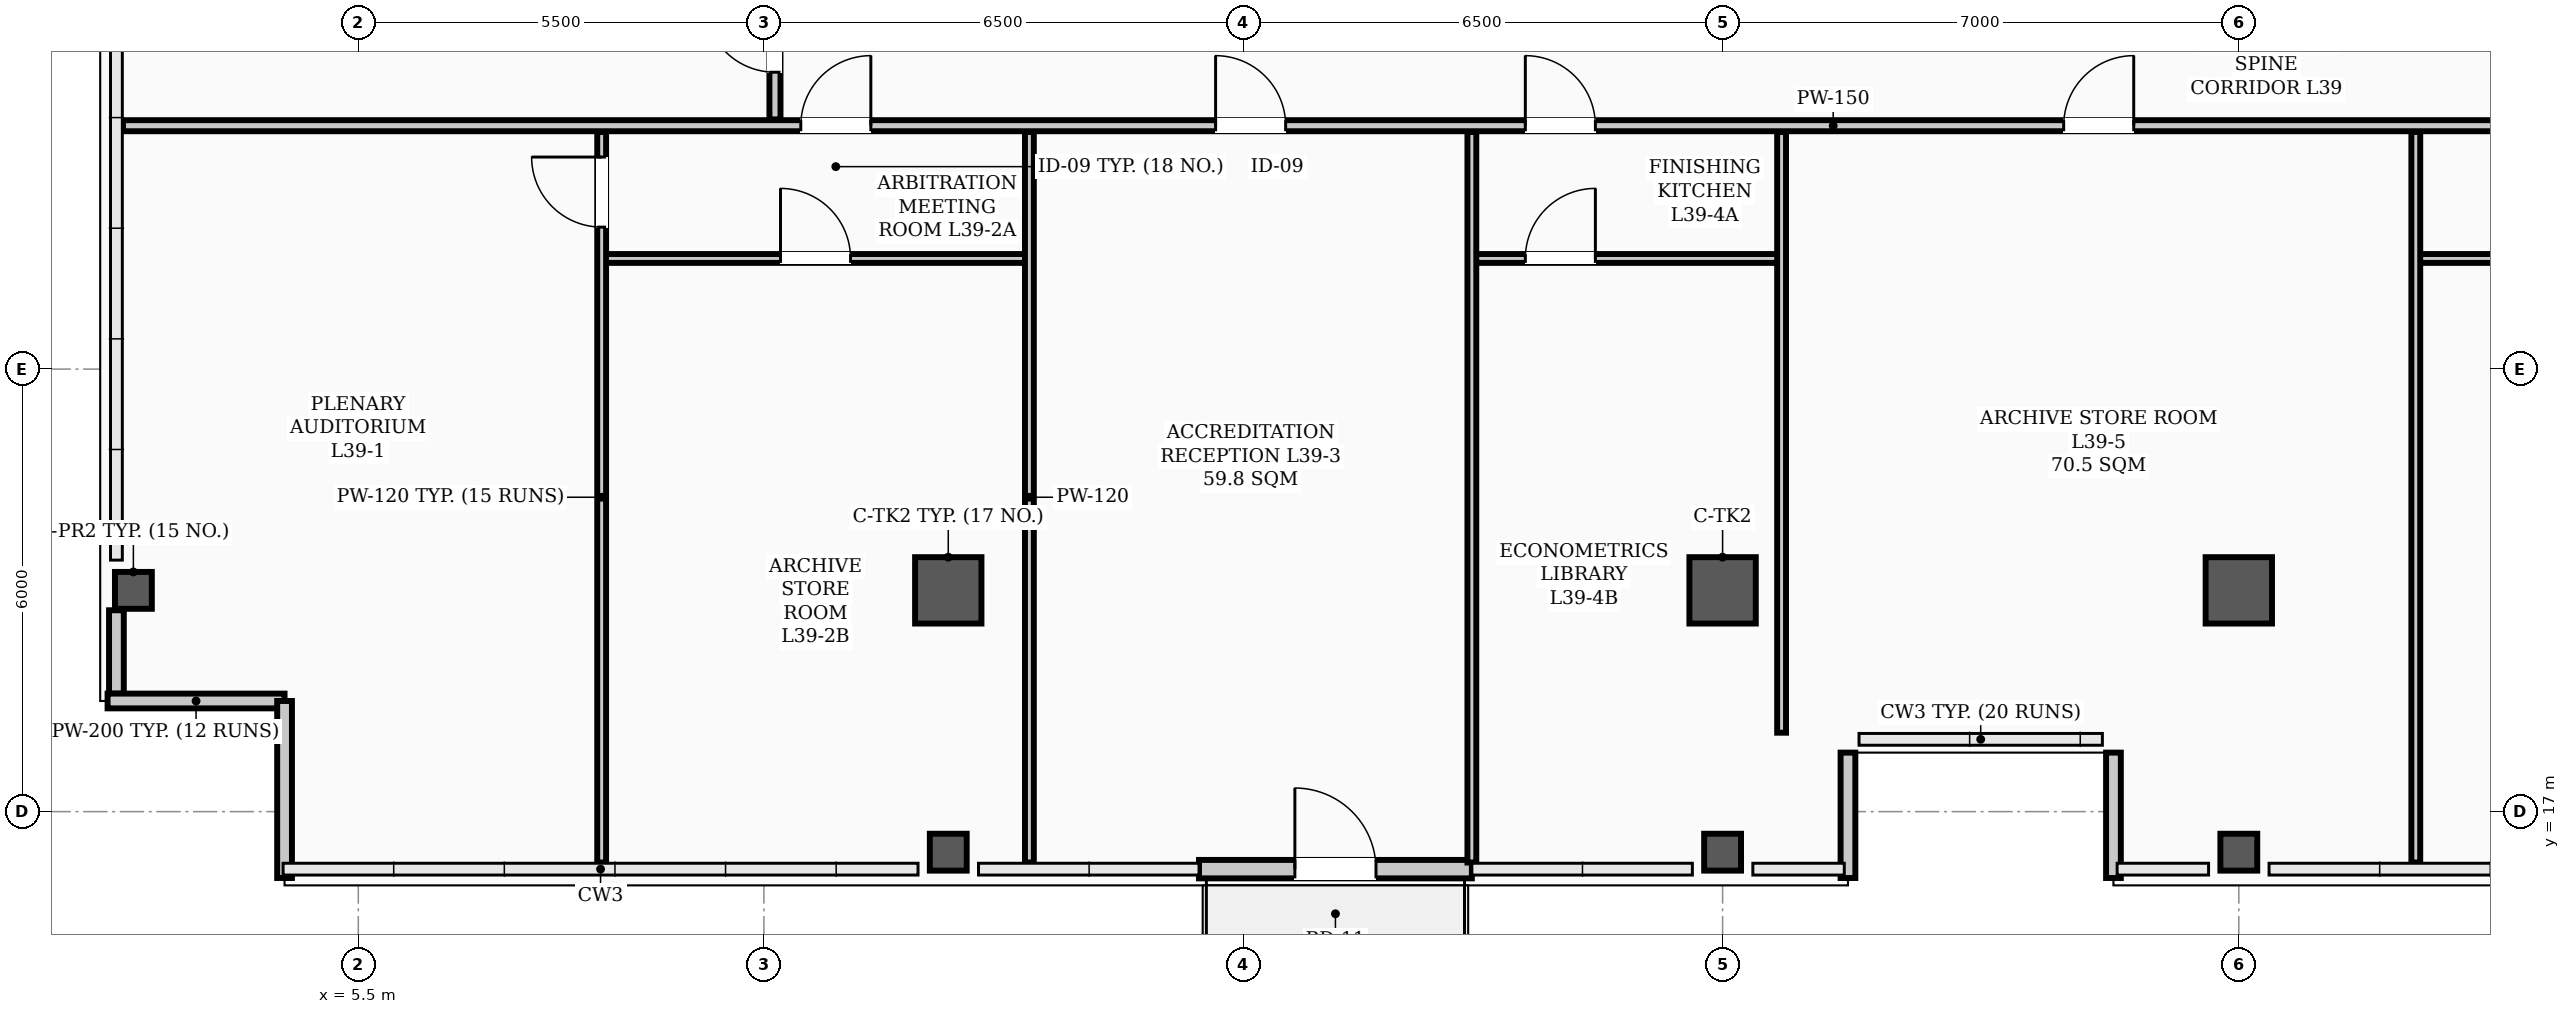
"""IFC4 building model, lengths in metres.
Left out: names, types, materials, properties, quantities, classifications, styles, units other than length and angle.
Written with IfcOpenShell. Run it as: python <this file> out.ifc"""

import sys

from ifc_helpers import new_model, si_unit, direction, frame, frame_2d, origin, origin_2d, place, context, subcontext, project, spatial, rectangle, hollow_rectangle, extrude, element, fill, save


model = new_model("IFC4")
c1 = context("Model", 3, precision=1e-05, world=origin(), true_north=direction((0.0, 1.0)))
c2 = subcontext(c1, "Body", "Model", "MODEL_VIEW")
j1 = project(units=[si_unit("LENGTHUNIT", "METRE"), si_unit("PLANEANGLEUNIT", "RADIAN")], contexts=[c1])
p1 = place(None, origin())
s1 = spatial("IfcSite", under=j1, at=p1, CompositionType="ELEMENT")
p2 = place(p1, origin())
s2 = spatial("IfcBuilding", under=s1, at=p2, CompositionType="ELEMENT")
p3 = place(p2, frame((0.0, 0.0, 157.8)))
s3 = spatial("IfcBuildingStorey", under=s2, at=p3, CompositionType="ELEMENT", Elevation=157.8)
for number, where, z_axis, x_axis in (
    (1, (13.5, 20.0, 0.0), (0.0, 0.0, 1.0), (1.0, 0.0, 0.0)),
    (2, (24.0, 20.0, 0.0), (0.0, 0.0, 1.0), (1.0, 0.0, 0.0)),
    (3, (31.0, 20.0, 0.0), (0.0, 0.0, 1.0), (1.0, 0.0, 0.0)),
):
    element("IfcColumn", number, at=place(p3, frame(where, z_axis=z_axis, x_axis=x_axis)), inside=s3, PredefinedType="COLUMN", context=c2, shape_type="SweptSolid", body=[
        extrude(hollow_rectangle(XDim=0.9, YDim=0.9, WallThickness=0.035, InnerFilletRadius=0.017, OuterFilletRadius=0.052, at=origin_2d()), origin(), (0.0, 0.0, 1.0), 3.9),
    ])
for number, where, z_axis, x_axis in (
    (4, (2.45, 20.0, 0.0), (0.0, 0.0, 1.0), (1.0, 0.0, 0.0)),
    (5, (13.5, 16.45, 0.0), (0.0, 0.0, 1.0), (1.0, 0.0, 0.0)),
    (6, (24.0, 16.45, 0.0), (0.0, 0.0, 1.0), (1.0, 0.0, 0.0)),
    (7, (31.0, 16.45, 0.0), (0.0, 0.0, 1.0), (1.0, 0.0, 0.0)),
):
    element("IfcColumn", number, at=place(p3, frame(where, z_axis=z_axis, x_axis=x_axis)), inside=s3, PredefinedType="COLUMN", context=c2, shape_type="SweptSolid", body=[
        extrude(hollow_rectangle(XDim=0.5, YDim=0.5, WallThickness=0.024, InnerFilletRadius=0.012, OuterFilletRadius=0.036, at=origin_2d()), origin(), (0.0, 0.0, 1.0), 3.9),
    ])
p4 = place(p3, frame((2.22, 18.6, 0.0), z_axis=(0.0, 0.0, 1.0), x_axis=(0.0, 1.0, 0.0)))
e8 = element("IfcWall", 8, at=p4, inside=s3, PredefinedType="PARAPET", context=c2, shape_type="SweptSolid", body=[
    extrude(rectangle(XDim=1.13, YDim=0.2, at=frame_2d((0.565, 0.0))), origin(), (0.0, 0.0, 1.0), 1.2),
])
for number, where, z_axis, x_axis in (
    (9, (2.1, 18.5, 0.0), (0.0, 0.0, 1.0), (1.0, 0.0, 0.0)),
    (10, (4.5, 18.5, 0.0), (0.0, 0.0, 1.0), (0.0, -1.0, 0.0)),
):
    element("IfcWall", number, at=place(p3, frame(where, z_axis=z_axis, x_axis=x_axis)), inside=s3, PredefinedType="PARAPET", context=c2, shape_type="SweptSolid", body=[
        extrude(rectangle(XDim=2.4, YDim=0.2, at=frame_2d((1.2, 0.0))), origin(), (0.0, 0.0, 1.0), 1.2),
    ])
for number, where, z_axis, x_axis in (
    (11, (25.7, 16.1, 0.0), (0.0, 0.0, 1.0), (0.0, 1.0, 0.0)),
    (12, (29.3, 17.8, 0.0), (0.0, 0.0, 1.0), (0.0, -1.0, 0.0)),
):
    element("IfcWall", number, at=place(p3, frame(where, z_axis=z_axis, x_axis=x_axis)), inside=s3, PredefinedType="PARAPET", context=c2, shape_type="SweptSolid", body=[
        extrude(rectangle(XDim=1.7, YDim=0.2, at=frame_2d((0.85, 0.0))), origin(), (0.0, 0.0, 1.0), 1.2),
    ])
p5 = place(p3, frame((16.9, 16.22, 0.0), z_axis=(0.0, 0.0, 1.0), x_axis=(1.0, 0.0, 0.0)))
e13 = element("IfcWall", 13, at=p5, inside=s3, PredefinedType="STANDARD", context=c2, shape_type="SweptSolid", body=[
    extrude(rectangle(XDim=3.7, YDim=0.25, at=frame_2d((1.85, 0.0))), origin(), (0.0, 0.0, 1.0), 3.18),
])
p6 = place(p5, frame((1.3, 0.0, 0.0)))
e14 = element("IfcOpeningElement", 14, at=p6, cuts=e13, PredefinedType="OPENING", context=c2, shape_type="SweptSolid", body=[
    extrude(rectangle(XDim=1.1, YDim=2.2, at=frame_2d((0.55, 1.1))), frame((0.0, 0.135, 0.0), z_axis=(0.0, -1.0, 0.0), x_axis=(1.0, 0.0, 0.0)), (0.0, 0.0, 1.0), 0.27),
])
p7 = place(p3, frame((2.31, 26.3, 0.0), z_axis=(0.0, 0.0, 1.0), x_axis=(1.0, 0.0, 0.0)))
e15 = element("IfcWall", 15, at=p7, inside=s3, PredefinedType="PARTITIONING", context=c2, shape_type="SweptSolid", body=[
    extrude(rectangle(XDim=46.38, YDim=0.15, at=frame_2d((23.19, 0.0))), origin(), (0.0, 0.0, 1.0), 3.2),
])
p8 = place(p7, frame((9.19, 0.0, 0.0)))
e16 = element("IfcOpeningElement", 16, at=p8, cuts=e15, PredefinedType="OPENING", context=c2, shape_type="SweptSolid", body=[
    extrude(rectangle(XDim=0.95, YDim=2.08, at=frame_2d((0.475, 1.04))), frame((0.0, 0.085, 0.0), z_axis=(0.0, -1.0, 0.0), x_axis=(1.0, 0.0, 0.0)), (0.0, 0.0, 1.0), 0.17),
])
p9 = place(p7, frame((14.815, 0.0, 0.0)))
e17 = element("IfcOpeningElement", 17, at=p9, cuts=e15, PredefinedType="OPENING", context=c2, shape_type="SweptSolid", body=[
    extrude(rectangle(XDim=0.95, YDim=2.08, at=frame_2d((0.475, 1.04))), frame((0.0, 0.085, 0.0), z_axis=(0.0, -1.0, 0.0), x_axis=(1.0, 0.0, 0.0)), (0.0, 0.0, 1.0), 0.17),
])
p10 = place(p7, frame((19.015, 0.0, 0.0)))
e18 = element("IfcOpeningElement", 18, at=p10, cuts=e15, PredefinedType="OPENING", context=c2, shape_type="SweptSolid", body=[
    extrude(rectangle(XDim=0.95, YDim=2.08, at=frame_2d((0.475, 1.04))), frame((0.0, 0.085, 0.0), z_axis=(0.0, -1.0, 0.0), x_axis=(1.0, 0.0, 0.0)), (0.0, 0.0, 1.0), 0.17),
])
p11 = place(p7, frame((26.315, 0.0, 0.0)))
e19 = element("IfcOpeningElement", 19, at=p11, cuts=e15, PredefinedType="OPENING", context=c2, shape_type="SweptSolid", body=[
    extrude(rectangle(XDim=0.95, YDim=2.08, at=frame_2d((0.475, 1.04))), frame((0.0, 0.085, 0.0), z_axis=(0.0, -1.0, 0.0), x_axis=(1.0, 0.0, 0.0)), (0.0, 0.0, 1.0), 0.17),
])
p12 = place(p7, frame((32.915, 0.0, 0.0)))
e20 = element("IfcOpeningElement", 20, at=p12, cuts=e15, PredefinedType="OPENING", context=c2, shape_type="SweptSolid", body=[
    extrude(rectangle(XDim=0.95, YDim=2.08, at=frame_2d((0.475, 1.04))), frame((0.0, 0.085, 0.0), z_axis=(0.0, -1.0, 0.0), x_axis=(1.0, 0.0, 0.0)), (0.0, 0.0, 1.0), 0.17),
])
p13 = place(p7, frame((38.065, 0.0, 0.0)))
e21 = element("IfcOpeningElement", 21, at=p13, cuts=e15, PredefinedType="OPENING", context=c2, shape_type="SweptSolid", body=[
    extrude(rectangle(XDim=0.95, YDim=2.08, at=frame_2d((0.475, 1.04))), frame((0.0, 0.085, 0.0), z_axis=(0.0, -1.0, 0.0), x_axis=(1.0, 0.0, 0.0)), (0.0, 0.0, 1.0), 0.17),
])
p14 = place(p3, frame((8.8, 24.5, 0.0), z_axis=(0.0, 0.0, 1.0), x_axis=(1.0, 0.0, 0.0)))
e22 = element("IfcWall", 22, at=p14, inside=s3, PredefinedType="PARTITIONING", context=c2, shape_type="SweptSolid", body=[
    extrude(rectangle(XDim=5.8, YDim=0.12, at=frame_2d((2.9, 0.0))), origin(), (0.0, 0.0, 1.0), 3.2),
])
p15 = place(p14, frame((2.425, 0.0, 0.0)))
e23 = element("IfcOpeningElement", 23, at=p15, cuts=e22, PredefinedType="OPENING", context=c2, shape_type="SweptSolid", body=[
    extrude(rectangle(XDim=0.95, YDim=2.08, at=frame_2d((0.475, 1.04))), frame((0.0, 0.07, 0.0), z_axis=(0.0, -1.0, 0.0), x_axis=(1.0, 0.0, 0.0)), (0.0, 0.0, 1.0), 0.14),
])
p16 = place(p3, frame((20.6, 24.5, 0.0), z_axis=(0.0, 0.0, 1.0), x_axis=(1.0, 0.0, 0.0)))
e24 = element("IfcWall", 24, at=p16, inside=s3, PredefinedType="PARTITIONING", context=c2, shape_type="SweptSolid", body=[
    extrude(rectangle(XDim=4.2, YDim=0.12, at=frame_2d((2.1, 0.0))), origin(), (0.0, 0.0, 1.0), 3.2),
])
p17 = place(p16, frame((0.725, 0.0, 0.0)))
e25 = element("IfcOpeningElement", 25, at=p17, cuts=e24, PredefinedType="OPENING", context=c2, shape_type="SweptSolid", body=[
    extrude(rectangle(XDim=0.95, YDim=2.08, at=frame_2d((0.475, 1.04))), frame((0.0, 0.07, 0.0), z_axis=(0.0, -1.0, 0.0), x_axis=(1.0, 0.0, 0.0)), (0.0, 0.0, 1.0), 0.14),
])
p18 = place(p3, frame((33.4, 24.5, 0.0), z_axis=(0.0, 0.0, 1.0), x_axis=(1.0, 0.0, 0.0)))
e26 = element("IfcWall", 26, at=p18, inside=s3, PredefinedType="PARTITIONING", context=c2, shape_type="SweptSolid", body=[
    extrude(rectangle(XDim=6.4, YDim=0.12, at=frame_2d((3.2, 0.0))), origin(), (0.0, 0.0, 1.0), 3.2),
])
p19 = place(p18, frame((1.825, 0.0, 0.0)))
e27 = element("IfcOpeningElement", 27, at=p19, cuts=e26, PredefinedType="OPENING", context=c2, shape_type="SweptSolid", body=[
    extrude(rectangle(XDim=0.95, YDim=2.08, at=frame_2d((0.475, 1.04))), frame((0.0, 0.07, 0.0), z_axis=(0.0, -1.0, 0.0), x_axis=(1.0, 0.0, 0.0)), (0.0, 0.0, 1.0), 0.14),
])
p20 = place(p3, frame((11.15, 26.385, 0.0), z_axis=(0.0, 0.0, 1.0), x_axis=(0.0, 1.0, 0.0)))
e28 = element("IfcWall", 28, at=p20, inside=s3, PredefinedType="PARTITIONING", context=c2, shape_type="SweptSolid", body=[
    extrude(rectangle(XDim=13.58, YDim=0.15, at=frame_2d((6.79, 0.0))), origin(), (0.0, 0.0, 1.0), 3.1),
])
p21 = place(p20, frame((0.64, 0.0, 0.0)))
e29 = element("IfcOpeningElement", 29, at=p21, cuts=e28, PredefinedType="OPENING", context=c2, shape_type="SweptSolid", body=[
    extrude(rectangle(XDim=0.95, YDim=2.08, at=frame_2d((0.475, 1.04))), frame((0.0, 0.085, 0.0), z_axis=(0.0, -1.0, 0.0), x_axis=(1.0, 0.0, 0.0)), (0.0, 0.0, 1.0), 0.17),
])
p22 = place(p20, frame((9.465, 0.0, 0.0)))
e30 = element("IfcOpeningElement", 30, at=p22, cuts=e28, PredefinedType="OPENING", context=c2, shape_type="SweptSolid", body=[
    extrude(rectangle(XDim=0.95, YDim=2.08, at=frame_2d((0.475, 1.04))), frame((0.0, 0.085, 0.0), z_axis=(0.0, -1.0, 0.0), x_axis=(1.0, 0.0, 0.0)), (0.0, 0.0, 1.0), 0.17),
])
p23 = place(p3, frame((8.8, 16.31, 0.0), z_axis=(0.0, 0.0, 1.0), x_axis=(0.0, 1.0, 0.0)))
e31 = element("IfcWall", 31, at=p23, inside=s3, PredefinedType="PARTITIONING", context=c2, shape_type="SweptSolid", body=[
    extrude(rectangle(XDim=9.905, YDim=0.12, at=frame_2d((4.953, 0.0))), origin(), (0.0, 0.0, 1.0), 3.1),
])
p24 = place(p23, frame((8.615, 0.0, 0.0)))
e32 = element("IfcOpeningElement", 32, at=p24, cuts=e31, PredefinedType="OPENING", context=c2, shape_type="SweptSolid", body=[
    extrude(rectangle(XDim=0.95, YDim=2.08, at=frame_2d((0.475, 1.04))), frame((0.0, 0.07, 0.0), z_axis=(0.0, -1.0, 0.0), x_axis=(1.0, 0.0, 0.0)), (0.0, 0.0, 1.0), 0.14),
])
for number, where, z_axis, x_axis in (
    (33, (14.6, 16.31, 0.0), (0.0, 0.0, 1.0), (0.0, 1.0, 0.0)),
    (34, (20.6, 16.31, 0.0), (0.0, 0.0, 1.0), (0.0, 1.0, 0.0)),
):
    element("IfcWall", number, at=place(p3, frame(where, z_axis=z_axis, x_axis=x_axis)), inside=s3, PredefinedType="PARTITIONING", context=c2, shape_type="SweptSolid", body=[
        extrude(rectangle(XDim=9.905, YDim=0.12, at=frame_2d((4.953, 0.0))), origin(), (0.0, 0.0, 1.0), 3.1),
    ])
p25 = place(p3, frame((24.8, 18.07, 0.0), z_axis=(0.0, 0.0, 1.0), x_axis=(0.0, 1.0, 0.0)))
e35 = element("IfcWall", 35, at=p25, inside=s3, PredefinedType="PARTITIONING", context=c2, shape_type="SweptSolid", body=[
    extrude(rectangle(XDim=8.145, YDim=0.12, at=frame_2d((4.073, 0.0))), origin(), (0.0, 0.0, 1.0), 3.1),
])
p26 = place(p3, frame((33.4, 16.31, 0.0), z_axis=(0.0, 0.0, 1.0), x_axis=(0.0, 1.0, 0.0)))
e36 = element("IfcWall", 36, at=p26, inside=s3, PredefinedType="PARTITIONING", context=c2, shape_type="SweptSolid", body=[
    extrude(rectangle(XDim=9.905, YDim=0.12, at=frame_2d((4.953, 0.0))), origin(), (0.0, 0.0, 1.0), 3.1),
])
p27 = place(p6, origin())
e37 = element("IfcDoor", 37, at=p27, inside=s3, OperationType="SINGLE_SWING_LEFT", PredefinedType="DOOR", context=c2, shape_type="SweptSolid", body=[
    extrude(rectangle(XDim=1.1, YDim=2.2, at=frame_2d((0.55, 1.1))), frame((0.0, 0.025, 0.0), z_axis=(0.0, -1.0, 0.0), x_axis=(1.0, 0.0, 0.0)), (0.0, 0.0, 1.0), 0.05),
])
fill(e14, e37)
p28 = place(p24, origin())
e38 = element("IfcDoor", 38, at=p28, inside=s3, OperationType="SINGLE_SWING_RIGHT", PredefinedType="DOOR", context=c2, shape_type="SweptSolid", body=[
    extrude(rectangle(XDim=0.95, YDim=2.08, at=frame_2d((0.475, 1.04))), frame((0.0, 0.025, 0.0), z_axis=(0.0, -1.0, 0.0), x_axis=(1.0, 0.0, 0.0)), (0.0, 0.0, 1.0), 0.05),
])
fill(e32, e38)
p29 = place(p15, origin())
e39 = element("IfcDoor", 39, at=p29, inside=s3, OperationType="SINGLE_SWING_LEFT", PredefinedType="DOOR", context=c2, shape_type="SweptSolid", body=[
    extrude(rectangle(XDim=0.95, YDim=2.08, at=frame_2d((0.475, 1.04))), frame((0.0, 0.025, 0.0), z_axis=(0.0, -1.0, 0.0), x_axis=(1.0, 0.0, 0.0)), (0.0, 0.0, 1.0), 0.05),
])
fill(e23, e39)
p30 = place(p8, origin())
e40 = element("IfcDoor", 40, at=p30, inside=s3, OperationType="SINGLE_SWING_RIGHT", PredefinedType="DOOR", context=c2, shape_type="SweptSolid", body=[
    extrude(rectangle(XDim=0.95, YDim=2.08, at=frame_2d((0.475, 1.04))), frame((0.0, 0.025, 0.0), z_axis=(0.0, -1.0, 0.0), x_axis=(1.0, 0.0, 0.0)), (0.0, 0.0, 1.0), 0.05),
])
fill(e16, e40)
p31 = place(p9, origin())
e41 = element("IfcDoor", 41, at=p31, inside=s3, OperationType="SINGLE_SWING_LEFT", PredefinedType="DOOR", context=c2, shape_type="SweptSolid", body=[
    extrude(rectangle(XDim=0.95, YDim=2.08, at=frame_2d((0.475, 1.04))), frame((0.0, 0.025, 0.0), z_axis=(0.0, -1.0, 0.0), x_axis=(1.0, 0.0, 0.0)), (0.0, 0.0, 1.0), 0.05),
])
fill(e17, e41)
p32 = place(p17, origin())
e42 = element("IfcDoor", 42, at=p32, inside=s3, OperationType="SINGLE_SWING_RIGHT", PredefinedType="DOOR", context=c2, shape_type="SweptSolid", body=[
    extrude(rectangle(XDim=0.95, YDim=2.08, at=frame_2d((0.475, 1.04))), frame((0.0, 0.025, 0.0), z_axis=(0.0, -1.0, 0.0), x_axis=(1.0, 0.0, 0.0)), (0.0, 0.0, 1.0), 0.05),
])
fill(e25, e42)
p33 = place(p10, origin())
e43 = element("IfcDoor", 43, at=p33, inside=s3, OperationType="SINGLE_SWING_LEFT", PredefinedType="DOOR", context=c2, shape_type="SweptSolid", body=[
    extrude(rectangle(XDim=0.95, YDim=2.08, at=frame_2d((0.475, 1.04))), frame((0.0, 0.025, 0.0), z_axis=(0.0, -1.0, 0.0), x_axis=(1.0, 0.0, 0.0)), (0.0, 0.0, 1.0), 0.05),
])
fill(e18, e43)
p34 = place(p11, origin())
e44 = element("IfcDoor", 44, at=p34, inside=s3, OperationType="SINGLE_SWING_RIGHT", PredefinedType="DOOR", context=c2, shape_type="SweptSolid", body=[
    extrude(rectangle(XDim=0.95, YDim=2.08, at=frame_2d((0.475, 1.04))), frame((0.0, 0.025, 0.0), z_axis=(0.0, -1.0, 0.0), x_axis=(1.0, 0.0, 0.0)), (0.0, 0.0, 1.0), 0.05),
])
fill(e19, e44)
p35 = place(p21, origin())
e45 = element("IfcDoor", 45, at=p35, inside=s3, OperationType="SINGLE_SWING_RIGHT", PredefinedType="DOOR", context=c2, shape_type="SweptSolid", body=[
    extrude(rectangle(XDim=0.95, YDim=2.08, at=frame_2d((0.475, 1.04))), frame((0.0, 0.025, 0.0), z_axis=(0.0, -1.0, 0.0), x_axis=(1.0, 0.0, 0.0)), (0.0, 0.0, 1.0), 0.05),
])
fill(e29, e45)
save(model, sys.argv[1])
